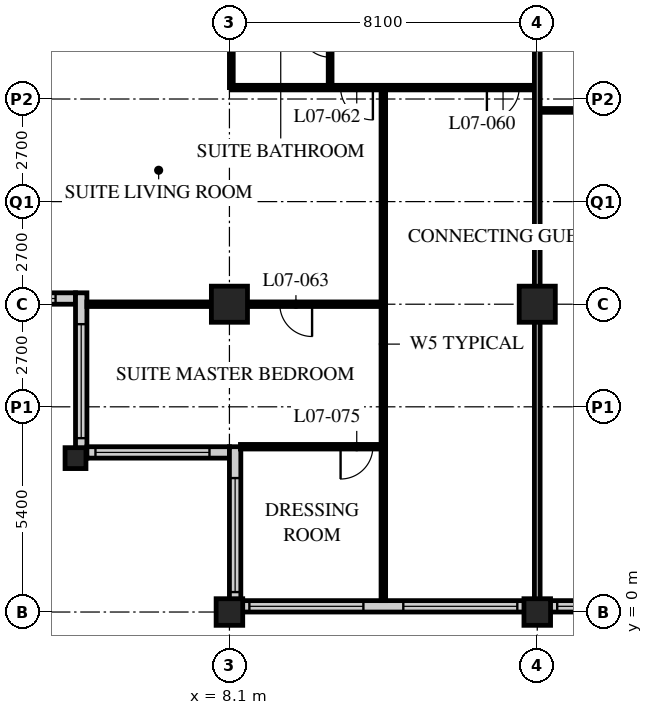
"""IFC4 building model, lengths in metres.
Left out: names, types, materials, properties, quantities, classifications, styles, units other than length and angle.
Written with IfcOpenShell. Run it as: python <this file> out.ifc"""

import sys

from ifc_helpers import new_model, si_unit, direction, frame, frame_2d, origin, origin_2d, place, context, subcontext, project, spatial, rectangle, hollow_rectangle, extrude, element, fill, save


model = new_model("IFC4")
c1 = context("Model", 3, precision=1e-05, world=origin(), true_north=direction((0.0, 1.0)))
c2 = subcontext(c1, "Body", "Model", "MODEL_VIEW")
j1 = project(units=[si_unit("LENGTHUNIT", "METRE"), si_unit("PLANEANGLEUNIT", "RADIAN")], contexts=[c1])
p1 = place(None, origin())
s1 = spatial("IfcSite", under=j1, at=p1, CompositionType="ELEMENT")
p2 = place(p1, origin())
s2 = spatial("IfcBuilding", under=s1, at=p2, CompositionType="ELEMENT")
p3 = place(p2, frame((0.0, 0.0, 36.4)))
s3 = spatial("IfcBuildingStorey", under=s2, at=p3, CompositionType="ELEMENT", Elevation=36.4)
p4 = place(p3, frame((4.05, 4.05, 0.0), z_axis=(0.0, 0.0, 1.0), x_axis=(1.0, 0.0, 0.0)))
e1 = element("IfcColumn", 1, at=p4, inside=s3, PredefinedType="COLUMN", context=c2, shape_type="SweptSolid", body=[
    extrude(hollow_rectangle(XDim=0.55, YDim=0.55, WallThickness=0.05, at=origin_2d()), origin(), (0.0, 0.0, 1.0), 3.4),
])
p5 = place(p3, frame((8.1, 0.0, 0.0), z_axis=(0.0, 0.0, 1.0), x_axis=(1.0, 0.0, 0.0)))
e2 = element("IfcColumn", 2, at=p5, inside=s3, PredefinedType="COLUMN", context=c2, shape_type="SweptSolid", body=[
    extrude(hollow_rectangle(XDim=0.7, YDim=0.7, WallThickness=0.06, at=origin_2d()), origin(), (0.0, 0.0, 1.0), 3.4),
])
p6 = place(p3, frame((8.1, 8.1, 0.0), z_axis=(0.0, 0.0, 1.0), x_axis=(1.0, 0.0, 0.0)))
e3 = element("IfcColumn", 3, at=p6, inside=s3, PredefinedType="COLUMN", context=c2, shape_type="SweptSolid", body=[
    extrude(hollow_rectangle(XDim=0.95, YDim=0.95, WallThickness=0.095, at=origin_2d()), origin(), (0.0, 0.0, 1.0), 3.4),
])
p7 = place(p3, frame((16.2, 0.0, 0.0), z_axis=(0.0, 0.0, 1.0), x_axis=(1.0, 0.0, 0.0)))
e4 = element("IfcColumn", 4, at=p7, inside=s3, PredefinedType="COLUMN", context=c2, shape_type="SweptSolid", body=[
    extrude(hollow_rectangle(XDim=0.7, YDim=0.7, WallThickness=0.06, at=origin_2d()), origin(), (0.0, 0.0, 1.0), 3.4),
])
p8 = place(p3, frame((16.2, 8.1, 0.0), z_axis=(0.0, 0.0, 1.0), x_axis=(1.0, 0.0, 0.0)))
e5 = element("IfcColumn", 5, at=p8, inside=s3, PredefinedType="COLUMN", context=c2, shape_type="SweptSolid", body=[
    extrude(hollow_rectangle(XDim=0.95, YDim=0.95, WallThickness=0.095, at=origin_2d()), origin(), (0.0, 0.0, 1.0), 3.4),
])
p9 = place(p3, frame((8.4, 0.15, 0.0), z_axis=(0.0, 0.0, 1.0), x_axis=(1.0, 0.0, 0.0)))
e6 = element("IfcWall", 6, at=p9, inside=s3, PredefinedType="SOLIDWALL", context=c2, shape_type="SweptSolid", body=[
    extrude(rectangle(XDim=40.2, YDim=0.3, at=frame_2d((20.1, 0.0))), origin(), (0.0, 0.0, 1.0), 3.19),
])
p10 = place(p9, frame((0.225, 0.0, 0.9)))
e7 = element("IfcOpeningElement", 7, at=p10, cuts=e6, PredefinedType="OPENING", context=c2, shape_type="SweptSolid", body=[
    extrude(rectangle(XDim=3.0, YDim=2.0, at=frame_2d((1.5, 1.0))), frame((0.0, 0.16, 0.0), z_axis=(0.0, -1.0, 0.0), x_axis=(1.0, 0.0, 0.0)), (0.0, 0.0, 1.0), 0.32),
])
p11 = place(p9, frame((4.275, 0.0, 0.9)))
e8 = element("IfcOpeningElement", 8, at=p11, cuts=e6, PredefinedType="OPENING", context=c2, shape_type="SweptSolid", body=[
    extrude(rectangle(XDim=3.0, YDim=2.0, at=frame_2d((1.5, 1.0))), frame((0.0, 0.16, 0.0), z_axis=(0.0, -1.0, 0.0), x_axis=(1.0, 0.0, 0.0)), (0.0, 0.0, 1.0), 0.32),
])
p12 = place(p9, frame((8.325, 0.0, 0.9)))
e9 = element("IfcOpeningElement", 9, at=p12, cuts=e6, PredefinedType="OPENING", context=c2, shape_type="SweptSolid", body=[
    extrude(rectangle(XDim=3.0, YDim=2.0, at=frame_2d((1.5, 1.0))), frame((0.0, 0.16, 0.0), z_axis=(0.0, -1.0, 0.0), x_axis=(1.0, 0.0, 0.0)), (0.0, 0.0, 1.0), 0.32),
])
p13 = place(p9, frame((12.375, 0.0, 0.9)))
e10 = element("IfcOpeningElement", 10, at=p13, cuts=e6, PredefinedType="OPENING", context=c2, shape_type="SweptSolid", body=[
    extrude(rectangle(XDim=3.0, YDim=2.0, at=frame_2d((1.5, 1.0))), frame((0.0, 0.16, 0.0), z_axis=(0.0, -1.0, 0.0), x_axis=(1.0, 0.0, 0.0)), (0.0, 0.0, 1.0), 0.32),
])
p14 = place(p9, frame((16.425, 0.0, 0.9)))
e11 = element("IfcOpeningElement", 11, at=p14, cuts=e6, PredefinedType="OPENING", context=c2, shape_type="SweptSolid", body=[
    extrude(rectangle(XDim=3.0, YDim=2.0, at=frame_2d((1.5, 1.0))), frame((0.0, 0.16, 0.0), z_axis=(0.0, -1.0, 0.0), x_axis=(1.0, 0.0, 0.0)), (0.0, 0.0, 1.0), 0.32),
])
p15 = place(p9, frame((20.475, 0.0, 0.9)))
e12 = element("IfcOpeningElement", 12, at=p15, cuts=e6, PredefinedType="OPENING", context=c2, shape_type="SweptSolid", body=[
    extrude(rectangle(XDim=3.0, YDim=2.0, at=frame_2d((1.5, 1.0))), frame((0.0, 0.16, 0.0), z_axis=(0.0, -1.0, 0.0), x_axis=(1.0, 0.0, 0.0)), (0.0, 0.0, 1.0), 0.32),
])
p16 = place(p9, frame((24.525, 0.0, 0.9)))
e13 = element("IfcOpeningElement", 13, at=p16, cuts=e6, PredefinedType="OPENING", context=c2, shape_type="SweptSolid", body=[
    extrude(rectangle(XDim=3.0, YDim=2.0, at=frame_2d((1.5, 1.0))), frame((0.0, 0.16, 0.0), z_axis=(0.0, -1.0, 0.0), x_axis=(1.0, 0.0, 0.0)), (0.0, 0.0, 1.0), 0.32),
])
p17 = place(p9, frame((28.575, 0.0, 0.9)))
e14 = element("IfcOpeningElement", 14, at=p17, cuts=e6, PredefinedType="OPENING", context=c2, shape_type="SweptSolid", body=[
    extrude(rectangle(XDim=3.0, YDim=2.0, at=frame_2d((1.5, 1.0))), frame((0.0, 0.16, 0.0), z_axis=(0.0, -1.0, 0.0), x_axis=(1.0, 0.0, 0.0)), (0.0, 0.0, 1.0), 0.32),
])
p18 = place(p9, frame((32.625, 0.0, 0.9)))
e15 = element("IfcOpeningElement", 15, at=p18, cuts=e6, PredefinedType="OPENING", context=c2, shape_type="SweptSolid", body=[
    extrude(rectangle(XDim=3.0, YDim=2.0, at=frame_2d((1.5, 1.0))), frame((0.0, 0.16, 0.0), z_axis=(0.0, -1.0, 0.0), x_axis=(1.0, 0.0, 0.0)), (0.0, 0.0, 1.0), 0.32),
])
p19 = place(p9, frame((36.675, 0.0, 0.9)))
e16 = element("IfcOpeningElement", 16, at=p19, cuts=e6, PredefinedType="OPENING", context=c2, shape_type="SweptSolid", body=[
    extrude(rectangle(XDim=3.0, YDim=2.0, at=frame_2d((1.5, 1.0))), frame((0.0, 0.16, 0.0), z_axis=(0.0, -1.0, 0.0), x_axis=(1.0, 0.0, 0.0)), (0.0, 0.0, 1.0), 0.32),
])
p20 = place(p3, frame((0.3, 8.25, 0.0), z_axis=(0.0, 0.0, 1.0), x_axis=(1.0, 0.0, 0.0)))
e17 = element("IfcWall", 17, at=p20, inside=s3, PredefinedType="SOLIDWALL", context=c2, shape_type="SweptSolid", body=[
    extrude(rectangle(XDim=3.75, YDim=0.3, at=frame_2d((1.875, 0.0))), origin(), (0.0, 0.0, 1.0), 3.19),
])
p21 = place(p20, frame((0.225, 0.0, 0.9)))
e18 = element("IfcOpeningElement", 18, at=p21, cuts=e17, PredefinedType="OPENING", context=c2, shape_type="SweptSolid", body=[
    extrude(rectangle(XDim=3.0, YDim=1.5, at=frame_2d((1.5, 0.75))), frame((0.0, 0.16, 0.0), z_axis=(0.0, -1.0, 0.0), x_axis=(1.0, 0.0, 0.0)), (0.0, 0.0, 1.0), 0.32),
])
p22 = place(p3, frame((4.2, 8.4, 0.0), z_axis=(0.0, 0.0, 1.0), x_axis=(0.0, -1.0, 0.0)))
e19 = element("IfcWall", 19, at=p22, inside=s3, PredefinedType="SOLIDWALL", context=c2, shape_type="SweptSolid", body=[
    extrude(rectangle(XDim=4.35, YDim=0.3, at=frame_2d((2.175, 0.0))), origin(), (0.0, 0.0, 1.0), 3.19),
])
p23 = place(p22, frame((0.825, 0.0, 0.9)))
e20 = element("IfcOpeningElement", 20, at=p23, cuts=e19, PredefinedType="OPENING", context=c2, shape_type="SweptSolid", body=[
    extrude(rectangle(XDim=3.0, YDim=1.5, at=frame_2d((1.5, 0.75))), frame((0.0, 0.16, 0.0), z_axis=(0.0, -1.0, 0.0), x_axis=(1.0, 0.0, 0.0)), (0.0, 0.0, 1.0), 0.32),
])
p24 = place(p3, frame((4.35, 4.2, 0.0), z_axis=(0.0, 0.0, 1.0), x_axis=(1.0, 0.0, 0.0)))
e21 = element("IfcWall", 21, at=p24, inside=s3, PredefinedType="SOLIDWALL", context=c2, shape_type="SweptSolid", body=[
    extrude(rectangle(XDim=3.75, YDim=0.3, at=frame_2d((1.875, 0.0))), origin(), (0.0, 0.0, 1.0), 3.19),
])
p25 = place(p24, frame((0.225, 0.0, 0.9)))
e22 = element("IfcOpeningElement", 22, at=p25, cuts=e21, PredefinedType="OPENING", context=c2, shape_type="SweptSolid", body=[
    extrude(rectangle(XDim=3.0, YDim=1.5, at=frame_2d((1.5, 0.75))), frame((0.0, 0.16, 0.0), z_axis=(0.0, -1.0, 0.0), x_axis=(1.0, 0.0, 0.0)), (0.0, 0.0, 1.0), 0.32),
])
p26 = place(p3, frame((8.25, 4.35, 0.0), z_axis=(0.0, 0.0, 1.0), x_axis=(0.0, -1.0, 0.0)))
e23 = element("IfcWall", 23, at=p26, inside=s3, PredefinedType="SOLIDWALL", context=c2, shape_type="SweptSolid", body=[
    extrude(rectangle(XDim=4.35, YDim=0.3, at=frame_2d((2.175, 0.0))), origin(), (0.0, 0.0, 1.0), 3.19),
])
p27 = place(p26, frame((0.825, 0.0, 0.9)))
e24 = element("IfcOpeningElement", 24, at=p27, cuts=e23, PredefinedType="OPENING", context=c2, shape_type="SweptSolid", body=[
    extrude(rectangle(XDim=3.0, YDim=1.5, at=frame_2d((1.5, 0.75))), frame((0.0, 0.16, 0.0), z_axis=(0.0, -1.0, 0.0), x_axis=(1.0, 0.0, 0.0)), (0.0, 0.0, 1.0), 0.32),
])
p28 = place(p3, frame((16.2, 13.2, 0.0), z_axis=(0.0, 0.0, 1.0), x_axis=(1.0, 0.0, 0.0)))
e25 = element("IfcWall", 25, at=p28, inside=s3, PredefinedType="PARTITIONING", context=c2, shape_type="SweptSolid", body=[
    extrude(rectangle(XDim=2.3, YDim=0.1, at=frame_2d((1.15, 0.0))), origin(), (0.0, 0.0, 1.0), 3.19),
])
p29 = place(p3, frame((10.75, 16.2, 0.0), z_axis=(0.0, 0.0, 1.0), x_axis=(0.0, -1.0, 0.0)))
e26 = element("IfcWall", 26, at=p29, inside=s3, PredefinedType="PARTITIONING", context=c2, shape_type="SweptSolid", body=[
    extrude(rectangle(XDim=2.4, YDim=0.1, at=frame_2d((1.2, 0.0))), origin(), (0.0, 0.0, 1.0), 3.19),
])
p30 = place(p29, frame((0.8, 0.0, 0.0)))
e27 = element("IfcOpeningElement", 27, at=p30, cuts=e26, PredefinedType="OPENING", context=c2, shape_type="SweptSolid", body=[
    extrude(rectangle(XDim=0.8, YDim=2.1, at=frame_2d((0.4, 1.05))), frame((0.0, 0.06, 0.0), z_axis=(0.0, -1.0, 0.0), x_axis=(1.0, 0.0, 0.0)), (0.0, 0.0, 1.0), 0.12),
])
p31 = place(p3, frame((8.15, 16.2, 0.0), z_axis=(0.0, 0.0, 1.0), x_axis=(0.0, -1.0, 0.0)))
e28 = element("IfcWall", 28, at=p31, inside=s3, PredefinedType="PARTITIONING", context=c2, shape_type="SweptSolid", body=[
    extrude(rectangle(XDim=2.4, YDim=0.1, at=frame_2d((1.2, 0.0))), origin(), (0.0, 0.0, 1.0), 2.578),
])
p32 = place(p3, frame((8.15, 13.8, 0.0), z_axis=(0.0, 0.0, 1.0), x_axis=(1.0, 0.0, 0.0)))
e29 = element("IfcWall", 29, at=p32, inside=s3, PredefinedType="PARTITIONING", context=c2, shape_type="SweptSolid", body=[
    extrude(rectangle(XDim=8.05, YDim=0.12, at=frame_2d((4.025, 0.0))), origin(), (0.0, 0.0, 1.0), 3.19),
])
p33 = place(p32, frame((6.725, 0.0, 0.0)))
e30 = element("IfcOpeningElement", 30, at=p33, cuts=e29, PredefinedType="OPENING", context=c2, shape_type="SweptSolid", body=[
    extrude(rectangle(XDim=0.85, YDim=2.1, at=frame_2d((0.425, 1.05))), frame((0.0, 0.07, 0.0), z_axis=(0.0, -1.0, 0.0), x_axis=(1.0, 0.0, 0.0)), (0.0, 0.0, 1.0), 0.14),
])
p34 = place(p32, frame((2.875, 0.0, 0.0)))
e31 = element("IfcOpeningElement", 31, at=p34, cuts=e29, PredefinedType="OPENING", context=c2, shape_type="SweptSolid", body=[
    extrude(rectangle(XDim=0.85, YDim=2.1, at=frame_2d((0.425, 1.05))), frame((0.0, 0.07, 0.0), z_axis=(0.0, -1.0, 0.0), x_axis=(1.0, 0.0, 0.0)), (0.0, 0.0, 1.0), 0.14),
])
p35 = place(p3, frame((12.15, 13.8, 0.0), z_axis=(0.0, 0.0, 1.0), x_axis=(0.0, -1.0, 0.0)))
e32 = element("IfcWall", 32, at=p35, inside=s3, PredefinedType="PARTITIONING", context=c2, shape_type="SweptSolid", body=[
    extrude(rectangle(XDim=13.5, YDim=0.12, at=frame_2d((6.75, 0.0))), origin(), (0.0, 0.0, 1.0), 3.19),
])
p36 = place(p3, frame((12.15, 8.1, 0.0), z_axis=(0.0, 0.0, 1.0), x_axis=(-1.0, 0.0, 0.0)))
e33 = element("IfcWall", 33, at=p36, inside=s3, PredefinedType="PARTITIONING", context=c2, shape_type="SweptSolid", body=[
    extrude(rectangle(XDim=7.8, YDim=0.12, at=frame_2d((3.9, 0.0))), origin(), (0.0, 0.0, 1.0), 2.578),
])
p37 = place(p36, frame((1.875, 0.0, 0.0)))
e34 = element("IfcOpeningElement", 34, at=p37, cuts=e33, PredefinedType="OPENING", context=c2, shape_type="SweptSolid", body=[
    extrude(rectangle(XDim=0.85, YDim=2.1, at=frame_2d((0.425, 1.05))), frame((0.0, 0.07, 0.0), z_axis=(0.0, -1.0, 0.0), x_axis=(1.0, 0.0, 0.0)), (0.0, 0.0, 1.0), 0.14),
])
p38 = place(p3, frame((16.2, 16.2, 0.0), z_axis=(0.0, 0.0, 1.0), x_axis=(0.0, -1.0, 0.0)))
e35 = element("IfcWall", 35, at=p38, inside=s3, PredefinedType="PARTITIONING", context=c2, shape_type="SweptSolid", body=[
    extrude(rectangle(XDim=15.9, YDim=0.15, at=frame_2d((7.95, 0.0))), origin(), (0.0, 0.0, 1.0), 2.578),
])
p39 = place(p3, frame((8.39, 4.35, 0.0), z_axis=(0.0, 0.0, 1.0), x_axis=(1.0, 0.0, 0.0)))
e36 = element("IfcWall", 36, at=p39, inside=s3, PredefinedType="PARTITIONING", context=c2, shape_type="SweptSolid", body=[
    extrude(rectangle(XDim=3.76, YDim=0.12, at=frame_2d((1.88, 0.0))), origin(), (0.0, 0.0, 1.0), 3.19),
])
p40 = place(p39, frame((2.635, 0.0, 0.0)))
e37 = element("IfcOpeningElement", 37, at=p40, cuts=e36, PredefinedType="OPENING", context=c2, shape_type="SweptSolid", body=[
    extrude(rectangle(XDim=0.85, YDim=2.1, at=frame_2d((0.425, 1.05))), frame((0.0, 0.07, 0.0), z_axis=(0.0, -1.0, 0.0), x_axis=(1.0, 0.0, 0.0)), (0.0, 0.0, 1.0), 0.14),
])
p41 = place(p10, origin())
e38 = element("IfcWindow", 38, at=p41, inside=s3, PartitioningType="SINGLE_PANEL", PredefinedType="WINDOW", context=c2, shape_type="SweptSolid", body=[
    extrude(rectangle(XDim=3.0, YDim=2.0, at=frame_2d((1.5, 1.0))), frame((0.0, 0.03, 0.0), z_axis=(0.0, -1.0, 0.0), x_axis=(1.0, 0.0, 0.0)), (0.0, 0.0, 1.0), 0.06),
])
fill(e7, e38)
p42 = place(p11, origin())
e39 = element("IfcWindow", 39, at=p42, inside=s3, PartitioningType="SINGLE_PANEL", PredefinedType="WINDOW", context=c2, shape_type="SweptSolid", body=[
    extrude(rectangle(XDim=3.0, YDim=2.0, at=frame_2d((1.5, 1.0))), frame((0.0, 0.03, 0.0), z_axis=(0.0, -1.0, 0.0), x_axis=(1.0, 0.0, 0.0)), (0.0, 0.0, 1.0), 0.06),
])
fill(e8, e39)
p43 = place(p12, origin())
e40 = element("IfcWindow", 40, at=p43, inside=s3, PartitioningType="SINGLE_PANEL", PredefinedType="WINDOW", context=c2, shape_type="SweptSolid", body=[
    extrude(rectangle(XDim=3.0, YDim=2.0, at=frame_2d((1.5, 1.0))), frame((0.0, 0.03, 0.0), z_axis=(0.0, -1.0, 0.0), x_axis=(1.0, 0.0, 0.0)), (0.0, 0.0, 1.0), 0.06),
])
fill(e9, e40)
p44 = place(p21, origin())
e41 = element("IfcWindow", 41, at=p44, inside=s3, PartitioningType="SINGLE_PANEL", PredefinedType="WINDOW", context=c2, shape_type="SweptSolid", body=[
    extrude(rectangle(XDim=3.0, YDim=1.5, at=frame_2d((1.5, 0.75))), frame((0.0, 0.03, 0.0), z_axis=(0.0, -1.0, 0.0), x_axis=(1.0, 0.0, 0.0)), (0.0, 0.0, 1.0), 0.06),
])
fill(e18, e41)
p45 = place(p23, origin())
e42 = element("IfcWindow", 42, at=p45, inside=s3, PartitioningType="SINGLE_PANEL", PredefinedType="WINDOW", context=c2, shape_type="SweptSolid", body=[
    extrude(rectangle(XDim=3.0, YDim=1.5, at=frame_2d((1.5, 0.75))), frame((0.0, 0.03, 0.0), z_axis=(0.0, -1.0, 0.0), x_axis=(1.0, 0.0, 0.0)), (0.0, 0.0, 1.0), 0.06),
])
fill(e20, e42)
p46 = place(p25, origin())
e43 = element("IfcWindow", 43, at=p46, inside=s3, PartitioningType="SINGLE_PANEL", PredefinedType="WINDOW", context=c2, shape_type="SweptSolid", body=[
    extrude(rectangle(XDim=3.0, YDim=1.5, at=frame_2d((1.5, 0.75))), frame((0.0, 0.03, 0.0), z_axis=(0.0, -1.0, 0.0), x_axis=(1.0, 0.0, 0.0)), (0.0, 0.0, 1.0), 0.06),
])
fill(e22, e43)
p47 = place(p27, origin())
e44 = element("IfcWindow", 44, at=p47, inside=s3, PartitioningType="SINGLE_PANEL", PredefinedType="WINDOW", context=c2, shape_type="SweptSolid", body=[
    extrude(rectangle(XDim=3.0, YDim=1.5, at=frame_2d((1.5, 0.75))), frame((0.0, 0.03, 0.0), z_axis=(0.0, -1.0, 0.0), x_axis=(1.0, 0.0, 0.0)), (0.0, 0.0, 1.0), 0.06),
])
fill(e24, e44)
p48 = place(p33, origin())
e45 = element("IfcDoor", 45, at=p48, inside=s3, OperationType="SINGLE_SWING_RIGHT", PredefinedType="DOOR", context=c2, shape_type="SweptSolid", body=[
    extrude(rectangle(XDim=0.85, YDim=2.1, at=frame_2d((0.425, 1.05))), frame((0.0, 0.025, 0.0), z_axis=(0.0, -1.0, 0.0), x_axis=(1.0, 0.0, 0.0)), (0.0, 0.0, 1.0), 0.05),
])
fill(e30, e45)
p49 = place(p30, origin())
e46 = element("IfcDoor", 46, at=p49, inside=s3, OperationType="SINGLE_SWING_RIGHT", PredefinedType="DOOR", context=c2, shape_type="SweptSolid", body=[
    extrude(rectangle(XDim=0.8, YDim=2.1, at=frame_2d((0.4, 1.05))), frame((0.0, 0.025, 0.0), z_axis=(0.0, -1.0, 0.0), x_axis=(1.0, 0.0, 0.0)), (0.0, 0.0, 1.0), 0.05),
])
fill(e27, e46)
p50 = place(p34, origin())
e47 = element("IfcDoor", 47, at=p50, inside=s3, OperationType="SINGLE_SWING_LEFT", PredefinedType="DOOR", context=c2, shape_type="SweptSolid", body=[
    extrude(rectangle(XDim=0.85, YDim=2.1, at=frame_2d((0.425, 1.05))), frame((0.0, 0.025, 0.0), z_axis=(0.0, -1.0, 0.0), x_axis=(1.0, 0.0, 0.0)), (0.0, 0.0, 1.0), 0.05),
])
fill(e31, e47)
p51 = place(p37, origin())
e48 = element("IfcDoor", 48, at=p51, inside=s3, OperationType="SINGLE_SWING_LEFT", PredefinedType="DOOR", context=c2, shape_type="SweptSolid", body=[
    extrude(rectangle(XDim=0.85, YDim=2.1, at=frame_2d((0.425, 1.05))), frame((0.0, 0.025, 0.0), z_axis=(0.0, -1.0, 0.0), x_axis=(1.0, 0.0, 0.0)), (0.0, 0.0, 1.0), 0.05),
])
fill(e34, e48)
p52 = place(p40, origin())
e49 = element("IfcDoor", 49, at=p52, inside=s3, OperationType="SINGLE_SWING_RIGHT", PredefinedType="DOOR", context=c2, shape_type="SweptSolid", body=[
    extrude(rectangle(XDim=0.85, YDim=2.1, at=frame_2d((0.425, 1.05))), frame((0.0, 0.025, 0.0), z_axis=(0.0, -1.0, 0.0), x_axis=(1.0, 0.0, 0.0)), (0.0, 0.0, 1.0), 0.05),
])
fill(e37, e49)
save(model, sys.argv[1])
